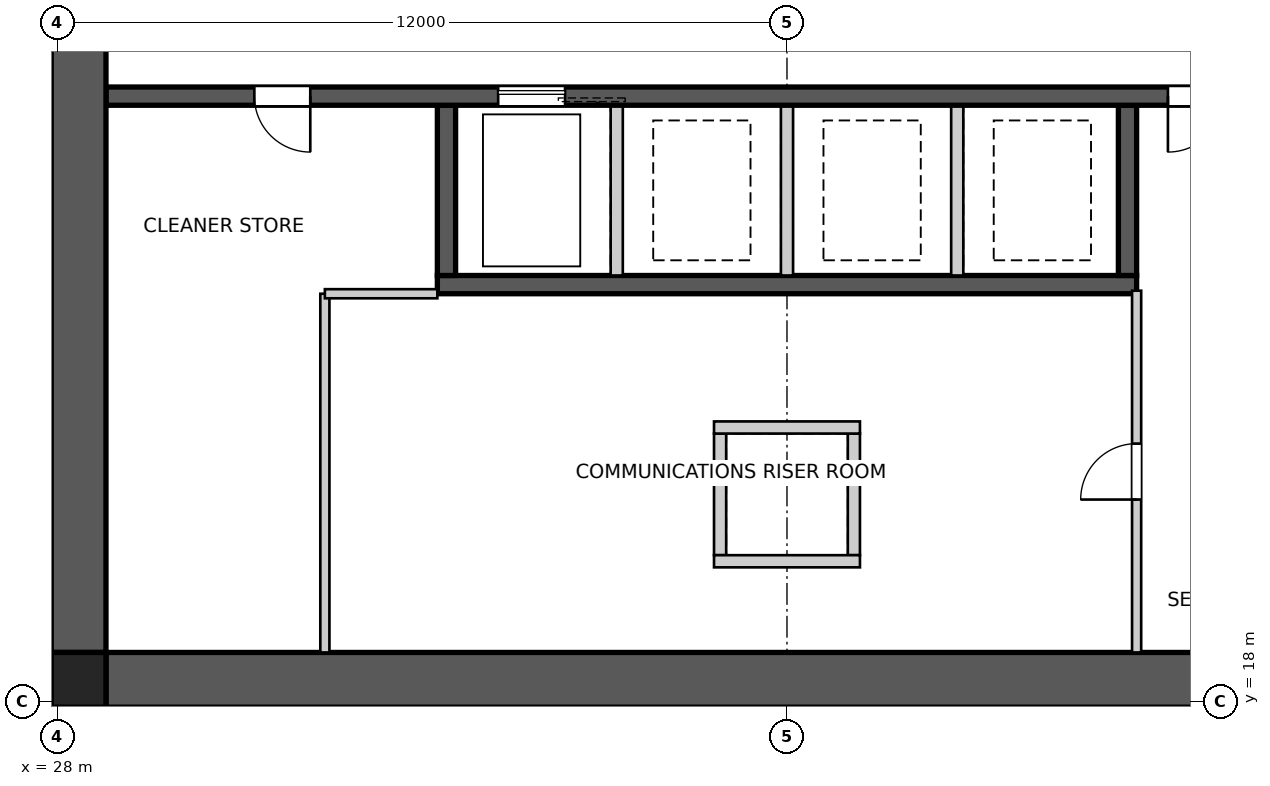
"""IFC4 building model, lengths in metres.
Left out: names, types, materials, properties, quantities, classifications, styles, units other than length and angle.
Written with IfcOpenShell. Run it as: python <this file> out.ifc"""

import sys

from ifc_helpers import new_model, si_unit, direction, frame, frame_2d, origin, origin_2d, place, context, subcontext, project, spatial, polyline, rectangle, outline, extrude, element, fill, save


model = new_model("IFC4")
c1 = context("Model", 3, precision=1e-05, world=origin(), true_north=direction((0.0, 1.0)))
c2 = subcontext(c1, "Body", "Model", "MODEL_VIEW")
j1 = project(units=[si_unit("LENGTHUNIT", "METRE"), si_unit("PLANEANGLEUNIT", "RADIAN")], contexts=[c1])
p1 = place(None, origin())
s1 = spatial("IfcSite", under=j1, at=p1, CompositionType="ELEMENT")
p2 = place(p1, origin())
s2 = spatial("IfcBuilding", under=s1, at=p2, CompositionType="ELEMENT")
p3 = place(p2, frame((0.0, 0.0, 42.2)))
s3 = spatial("IfcBuildingStorey", under=s2, at=p3, CompositionType="ELEMENT", Elevation=42.2)
p4 = place(p3, frame((51.2, 18.35, 0.0), z_axis=(0.0, 0.0, 1.0), x_axis=(-1.0, 0.0, 0.0)))
e1 = element("IfcWall", 1, at=p4, inside=s3, PredefinedType="SHEAR", context=c2, shape_type="SweptSolid", body=[
    extrude(outline(polyline([(0.0, -0.45), (22.4, -0.45), (22.4, -0.025), (22.85, -0.025), (22.85, 0.025), (22.4, 0.025), (22.4, 0.45), (0.0, 0.45), (0.0, 0.025), (-0.45, 0.025), (-0.45, -0.025), (0.0, -0.025), (0.0, -0.45)])), origin(), (0.0, 0.0, 1.0), 5.0),
])
p5 = place(p3, frame((28.35, 41.2, 0.0), z_axis=(0.0, 0.0, 1.0), x_axis=(0.0, -1.0, 0.0)))
e2 = element("IfcWall", 2, at=p5, inside=s3, PredefinedType="SHEAR", context=c2, shape_type="SweptSolid", body=[
    extrude(outline(polyline([(0.0, -0.45), (22.4, -0.45), (22.4, -0.025), (22.85, -0.025), (22.85, 0.025), (22.4, 0.025), (22.4, 0.45), (0.0, 0.45), (0.0, 0.025), (-0.45, 0.025), (-0.45, -0.025), (0.0, -0.025), (0.0, -0.45)])), origin(), (0.0, 0.0, 1.0), 5.0),
])
p6 = place(p5, frame((11.14, 0.0, 0.0)))
e3 = element("IfcOpeningElement", 3, at=p6, cuts=e2, PredefinedType="OPENING", context=c2, shape_type="SweptSolid", body=[
    extrude(rectangle(XDim=1.02, YDim=2.4, at=frame_2d((0.51, 1.2))), frame((0.0, 0.46, 0.0), z_axis=(0.0, -1.0, 0.0), x_axis=(1.0, 0.0, 0.0)), (0.0, 0.0, 1.0), 0.92),
])
p7 = place(p3, frame((51.2, 27.95, 0.0), z_axis=(0.0, 0.0, 1.0), x_axis=(-1.0, 0.0, 0.0)))
e4 = element("IfcWall", 4, at=p7, inside=s3, PredefinedType="SHEAR", context=c2, shape_type="SweptSolid", body=[
    extrude(rectangle(XDim=22.4, YDim=0.3, at=frame_2d((11.2, 0.0))), origin(), (0.0, 0.0, 1.0), 5.0),
])
p8 = place(p7, frame((19.04, 0.0, 0.0)))
e5 = element("IfcOpeningElement", 5, at=p8, cuts=e4, PredefinedType="OPENING", context=c2, shape_type="SweptSolid", body=[
    extrude(rectangle(XDim=0.92, YDim=2.1, at=frame_2d((0.46, 1.05))), frame((0.0, 0.16, 0.0), z_axis=(0.0, -1.0, 0.0), x_axis=(1.0, 0.0, 0.0)), (0.0, 0.0, 1.0), 0.32),
])
p9 = place(p7, frame((1.265, 0.0, 0.0)))
e6 = element("IfcOpeningElement", 6, at=p9, cuts=e4, PredefinedType="OPENING", context=c2, shape_type="SweptSolid", body=[
    extrude(rectangle(XDim=1.02, YDim=2.1, at=frame_2d((0.51, 1.05))), frame((0.0, 0.16, 0.0), z_axis=(0.0, -1.0, 0.0), x_axis=(1.0, 0.0, 0.0)), (0.0, 0.0, 1.0), 0.32),
])
p10 = place(p7, frame((4.015, 0.0, 0.0)))
e7 = element("IfcOpeningElement", 7, at=p10, cuts=e4, PredefinedType="OPENING", context=c2, shape_type="SweptSolid", body=[
    extrude(rectangle(XDim=0.92, YDim=2.1, at=frame_2d((0.46, 1.05))), frame((0.0, 0.16, 0.0), z_axis=(0.0, -1.0, 0.0), x_axis=(1.0, 0.0, 0.0)), (0.0, 0.0, 1.0), 0.32),
])
p11 = place(p7, frame((14.85, 0.0, 0.0)))
e8 = element("IfcOpeningElement", 8, at=p11, cuts=e4, PredefinedType="OPENING", context=c2, shape_type="SweptSolid", body=[
    extrude(rectangle(XDim=1.1, YDim=2.1, at=frame_2d((0.55, 1.05))), frame((0.0, 0.16, 0.0), z_axis=(0.0, -1.0, 0.0), x_axis=(1.0, 0.0, 0.0)), (0.0, 0.0, 1.0), 0.32),
])
p12 = place(p3, frame((45.75, 24.85, 0.0), z_axis=(0.0, 0.0, 1.0), x_axis=(-1.0, 0.0, 0.0)))
e9 = element("IfcWall", 9, at=p12, inside=s3, PredefinedType="SHEAR", context=c2, shape_type="SweptSolid", body=[
    extrude(rectangle(XDim=11.5, YDim=0.3, at=frame_2d((5.75, 0.0))), origin(), (0.0, 0.0, 1.0), 5.0),
])
p13 = place(p3, frame((45.6, 27.8, 0.0), z_axis=(0.0, 0.0, 1.0), x_axis=(0.0, -1.0, 0.0)))
e10 = element("IfcWall", 10, at=p13, inside=s3, PredefinedType="SHEAR", context=c2, shape_type="SweptSolid", body=[
    extrude(rectangle(XDim=2.8, YDim=0.3, at=frame_2d((1.4, 0.0))), origin(), (0.0, 0.0, 1.0), 5.0),
])
for number, where, z_axis, x_axis in (
    (11, (42.8, 27.8, 0.0), (0.0, 0.0, 1.0), (0.0, -1.0, 0.0)),
    (12, (40.0, 27.8, 0.0), (0.0, 0.0, 1.0), (0.0, -1.0, 0.0)),
    (13, (37.2, 27.8, 0.0), (0.0, 0.0, 1.0), (0.0, -1.0, 0.0)),
):
    element("IfcWall", number, at=place(p3, frame(where, z_axis=z_axis, x_axis=x_axis)), inside=s3, PredefinedType="SOLIDWALL", context=c2, shape_type="SweptSolid", body=[
        extrude(rectangle(XDim=2.8, YDim=0.2, at=frame_2d((1.4, 0.0))), origin(), (0.0, 0.0, 1.0), 5.0),
    ])
p14 = place(p3, frame((34.4, 27.8, 0.0), z_axis=(0.0, 0.0, 1.0), x_axis=(0.0, -1.0, 0.0)))
e14 = element("IfcWall", 14, at=p14, inside=s3, PredefinedType="SHEAR", context=c2, shape_type="SweptSolid", body=[
    extrude(rectangle(XDim=2.8, YDim=0.3, at=frame_2d((1.4, 0.0))), origin(), (0.0, 0.0, 1.0), 5.0),
])
for number, where, z_axis, x_axis in (
    (15, (38.9, 22.4, 0.0), (0.0, 0.0, 1.0), (0.0, -1.0, 0.0)),
    (16, (41.1, 22.4, 0.0), (0.0, 0.0, 1.0), (0.0, -1.0, 0.0)),
):
    element("IfcWall", number, at=place(p3, frame(where, z_axis=z_axis, x_axis=x_axis)), inside=s3, PredefinedType="SOLIDWALL", context=c2, shape_type="SweptSolid", body=[
        extrude(rectangle(XDim=2.0, YDim=0.2, at=frame_2d((1.0, 0.0))), origin(), (0.0, 0.0, 1.0), 5.0),
    ])
for number, where, z_axis, x_axis in (
    (17, (38.8, 22.5, 0.0), (0.0, 0.0, 1.0), (1.0, 0.0, 0.0)),
    (18, (38.8, 20.3, 0.0), (0.0, 0.0, 1.0), (1.0, 0.0, 0.0)),
):
    element("IfcWall", number, at=place(p3, frame(where, z_axis=z_axis, x_axis=x_axis)), inside=s3, PredefinedType="SOLIDWALL", context=c2, shape_type="SweptSolid", body=[
        extrude(rectangle(XDim=2.4, YDim=0.2, at=frame_2d((1.2, 0.0))), origin(), (0.0, 0.0, 1.0), 5.0),
    ])
p15 = place(p3, frame((28.35, 18.35, 0.0), z_axis=(0.0, 0.0, 1.0), x_axis=(1.0, 0.0, 0.0)))
e19 = element("IfcColumn", 19, at=p15, inside=s3, PredefinedType="COLUMN", context=c2, shape_type="SweptSolid", body=[
    extrude(rectangle(XDim=0.9, YDim=0.9, at=origin_2d()), origin(), (0.0, 0.0, 1.0), 5.0),
])
p16 = place(p3, frame((45.75, 18.8, 0.0), z_axis=(0.0, 0.0, 1.0), x_axis=(0.0, 1.0, 0.0)))
e20 = element("IfcWall", 20, at=p16, inside=s3, PredefinedType="SOLIDWALL", context=c2, shape_type="SweptSolid", body=[
    extrude(rectangle(XDim=5.95, YDim=0.15, at=frame_2d((2.975, 0.0))), origin(), (0.0, 0.0, 1.0), 4.85),
])
p17 = place(p16, frame((2.515, 0.0, 0.0)))
e21 = element("IfcOpeningElement", 21, at=p17, cuts=e20, PredefinedType="OPENING", context=c2, shape_type="SweptSolid", body=[
    extrude(rectangle(XDim=0.92, YDim=2.1, at=frame_2d((0.46, 1.05))), frame((0.0, 0.085, 0.0), z_axis=(0.0, -1.0, 0.0), x_axis=(1.0, 0.0, 0.0)), (0.0, 0.0, 1.0), 0.17),
])
p18 = place(p3, frame((32.4, 18.8, 0.0), z_axis=(0.0, 0.0, 1.0), x_axis=(0.0, 1.0, 0.0)))
e22 = element("IfcWall", 22, at=p18, inside=s3, PredefinedType="SOLIDWALL", context=c2, shape_type="SweptSolid", body=[
    extrude(rectangle(XDim=5.9, YDim=0.15, at=frame_2d((2.95, 0.0))), origin(), (0.0, 0.0, 1.0), 4.85),
])
p19 = place(p3, frame((32.4, 24.7, 0.0), z_axis=(0.0, 0.0, 1.0), x_axis=(1.0, 0.0, 0.0)))
e23 = element("IfcWall", 23, at=p19, inside=s3, PredefinedType="SOLIDWALL", context=c2, shape_type="SweptSolid", body=[
    extrude(rectangle(XDim=1.85, YDim=0.15, at=frame_2d((0.925, 0.0))), origin(), (0.0, 0.0, 1.0), 4.85),
])
p20 = place(p8, origin())
e24 = element("IfcDoor", 24, at=p20, inside=s3, OperationType="SINGLE_SWING_LEFT", PredefinedType="DOOR", context=c2, shape_type="SweptSolid", body=[
    extrude(rectangle(XDim=0.92, YDim=2.1, at=frame_2d((0.46, 1.05))), frame((0.0, 0.025, 0.0), z_axis=(0.0, -1.0, 0.0), x_axis=(1.0, 0.0, 0.0)), (0.0, 0.0, 1.0), 0.05),
])
fill(e5, e24)
p21 = place(p10, origin())
e25 = element("IfcDoor", 25, at=p21, inside=s3, OperationType="SINGLE_SWING_RIGHT", PredefinedType="DOOR", context=c2, shape_type="SweptSolid", body=[
    extrude(rectangle(XDim=0.92, YDim=2.1, at=frame_2d((0.46, 1.05))), frame((0.0, 0.025, 0.0), z_axis=(0.0, -1.0, 0.0), x_axis=(1.0, 0.0, 0.0)), (0.0, 0.0, 1.0), 0.05),
])
fill(e7, e25)
p22 = place(p17, origin())
e26 = element("IfcDoor", 26, at=p22, inside=s3, OperationType="SINGLE_SWING_LEFT", PredefinedType="DOOR", context=c2, shape_type="SweptSolid", body=[
    extrude(rectangle(XDim=0.92, YDim=2.1, at=frame_2d((0.46, 1.05))), frame((0.0, 0.025, 0.0), z_axis=(0.0, -1.0, 0.0), x_axis=(1.0, 0.0, 0.0)), (0.0, 0.0, 1.0), 0.05),
])
fill(e21, e26)
p23 = place(p11, origin())
e27 = element("IfcDoor", 27, at=p23, inside=s3, OperationType="SLIDING_TO_LEFT", PredefinedType="DOOR", context=c2, shape_type="SweptSolid", body=[
    extrude(rectangle(XDim=1.1, YDim=2.1, at=frame_2d((0.55, 1.05))), frame((0.0, 0.025, 0.0), z_axis=(0.0, -1.0, 0.0), x_axis=(1.0, 0.0, 0.0)), (0.0, 0.0, 1.0), 0.05),
])
fill(e8, e27)
save(model, sys.argv[1])
